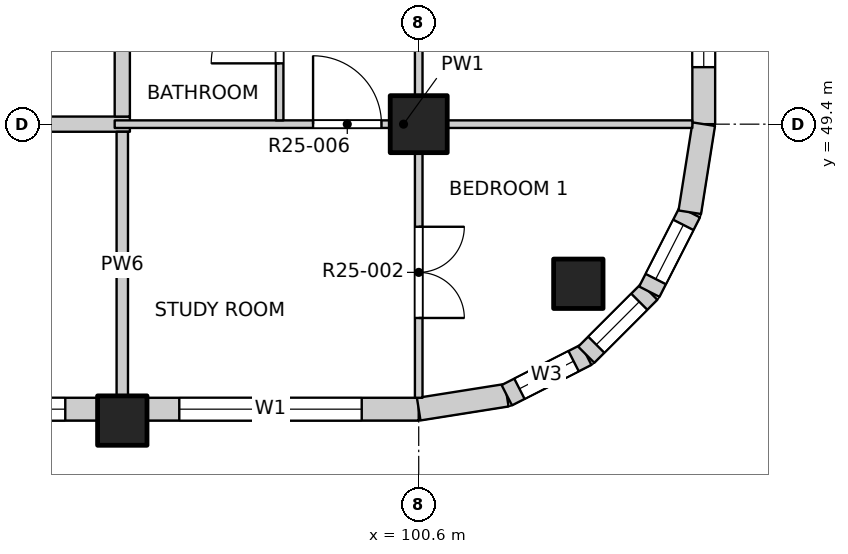
"""IFC4 building model, lengths in metres.
Left out: names, types, materials, properties, quantities, classifications, styles, units other than length and angle.
Written with IfcOpenShell. Run it as: python <this file> out.ifc"""

import sys

from ifc_helpers import new_model, si_unit, direction, frame, frame_2d, origin, origin_2d, place, context, subcontext, project, spatial, rectangle, extrude, element, fill, save


model = new_model("IFC4")
c1 = context("Model", 3, precision=1e-05, world=origin(), true_north=direction((0.0, 1.0)))
c2 = subcontext(c1, "Body", "Model", "MODEL_VIEW")
j1 = project(units=[si_unit("LENGTHUNIT", "METRE"), si_unit("PLANEANGLEUNIT", "RADIAN")], contexts=[c1])
p1 = place(None, origin())
s1 = spatial("IfcSite", under=j1, at=p1, CompositionType="ELEMENT")
p2 = place(p1, origin())
s2 = spatial("IfcBuilding", under=s1, at=p2, CompositionType="ELEMENT")
p3 = place(p2, frame((0.0, 0.0, 252.8)))
s3 = spatial("IfcBuildingStorey", under=s2, at=p3, CompositionType="ELEMENT", Elevation=252.8)
for number, where, z_axis, x_axis in (
    (1, (102.7, 47.3, -0.25), (0.0, 0.0, 1.0), (1.0, 0.0, 0.0)),
    (2, (96.7, 45.5, -0.25), (0.0, 0.0, 1.0), (1.0, 0.0, 0.0)),
):
    element("IfcColumn", number, at=place(p3, frame(where, z_axis=z_axis, x_axis=x_axis)), inside=s3, PredefinedType="COLUMN", context=c2, shape_type="SweptSolid", body=[
        extrude(rectangle(XDim=0.65, YDim=0.65, at=origin_2d()), origin(), (0.0, 0.0, 1.0), 3.4),
    ])
p4 = place(p3, frame((100.6, 49.4, -0.25), z_axis=(0.0, 0.0, 1.0), x_axis=(1.0, 0.0, 0.0)))
e3 = element("IfcColumn", 3, at=p4, inside=s3, PredefinedType="COLUMN", context=c2, shape_type="SweptSolid", body=[
    extrude(rectangle(XDim=0.75, YDim=0.75, at=origin_2d()), origin(), (0.0, 0.0, 1.0), 3.4),
])
p5 = place(p3, frame((89.225, 45.65, 0.0), z_axis=(0.0, 0.0, 1.0), x_axis=(1.0, 0.0, 0.0)))
e4 = element("IfcWall", 4, at=p5, inside=s3, PredefinedType="SOLIDWALL", context=c2, shape_type="SweptSolid", body=[
    extrude(rectangle(XDim=7.15, YDim=0.3, at=frame_2d((3.575, 0.0))), origin(), (0.0, 0.0, 1.0), 2.7),
])
p6 = place(p5, frame((0.425, 0.0, 0.9)))
e5 = element("IfcOpeningElement", 5, at=p6, cuts=e4, PredefinedType="OPENING", context=c2, shape_type="SweptSolid", body=[
    extrude(rectangle(XDim=2.4, YDim=1.8, at=frame_2d((1.2, 0.9))), frame((0.0, 0.16, 0.0), z_axis=(0.0, -1.0, 0.0), x_axis=(1.0, 0.0, 0.0)), (0.0, 0.0, 1.0), 0.32),
])
p7 = place(p5, frame((4.325, 0.0, 0.9)))
e6 = element("IfcOpeningElement", 6, at=p7, cuts=e4, PredefinedType="OPENING", context=c2, shape_type="SweptSolid", body=[
    extrude(rectangle(XDim=2.4, YDim=1.8, at=frame_2d((1.2, 0.9))), frame((0.0, 0.16, 0.0), z_axis=(0.0, -1.0, 0.0), x_axis=(1.0, 0.0, 0.0)), (0.0, 0.0, 1.0), 0.32),
])
p8 = place(p3, frame((97.025, 45.65, 0.0), z_axis=(0.0, 0.0, 1.0), x_axis=(1.0, 0.0, 0.0)))
e7 = element("IfcWall", 7, at=p8, inside=s3, PredefinedType="SOLIDWALL", context=c2, shape_type="SweptSolid", body=[
    extrude(rectangle(XDim=3.575, YDim=0.3, at=frame_2d((1.788, 0.0))), origin(), (0.0, 0.0, 1.0), 2.7),
])
p9 = place(p8, frame((0.425, 0.0, 0.9)))
e8 = element("IfcOpeningElement", 8, at=p9, cuts=e7, PredefinedType="OPENING", context=c2, shape_type="SweptSolid", body=[
    extrude(rectangle(XDim=2.4, YDim=1.8, at=frame_2d((1.2, 0.9))), frame((0.0, 0.16, 0.0), z_axis=(0.0, -1.0, 0.0), x_axis=(1.0, 0.0, 0.0)), (0.0, 0.0, 1.0), 0.32),
])
p10 = place(p3, frame((104.35, 49.4, 0.0), z_axis=(0.0, 0.0, 1.0), x_axis=(0.0, 1.0, 0.0)))
e9 = element("IfcWall", 9, at=p10, inside=s3, PredefinedType="SOLIDWALL", context=c2, shape_type="SweptSolid", body=[
    extrude(rectangle(XDim=3.575, YDim=0.3, at=frame_2d((1.788, 0.0))), origin(), (0.0, 0.0, 1.0), 2.7),
])
p11 = place(p10, frame((0.75, 0.0, 0.9)))
e10 = element("IfcOpeningElement", 10, at=p11, cuts=e9, PredefinedType="OPENING", context=c2, shape_type="SweptSolid", body=[
    extrude(rectangle(XDim=2.4, YDim=1.8, at=frame_2d((1.2, 0.9))), frame((0.0, 0.16, 0.0), z_axis=(0.0, -1.0, 0.0), x_axis=(1.0, 0.0, 0.0)), (0.0, 0.0, 1.0), 0.32),
])
p12 = place(p3, frame((100.6, 45.65, 0.0), z_axis=(0.0, 0.0, 1.0), x_axis=(0.987678452879, 0.156496880861, 0.0)))
e11 = element("IfcWall", 11, at=p12, inside=s3, PredefinedType="SOLIDWALL", context=c2, shape_type="SweptSolid", body=[
    extrude(rectangle(XDim=1.173, YDim=0.3, at=frame_2d((0.586, 0.0))), origin(), (0.0, 0.0, 1.0), 2.7),
])
p13 = place(p3, frame((101.759, 45.833, 0.0), z_axis=(0.0, 0.0, 1.0), x_axis=(0.890988677504, 0.454025524128, 0.0)))
e12 = element("IfcWall", 12, at=p13, inside=s3, PredefinedType="SOLIDWALL", context=c2, shape_type="SweptSolid", body=[
    extrude(rectangle(XDim=1.173, YDim=0.3, at=frame_2d((0.587, 0.0))), origin(), (0.0, 0.0, 1.0), 2.7),
])
p14 = place(p13, frame((0.187, 0.0, 0.9)))
e13 = element("IfcOpeningElement", 13, at=p14, cuts=e12, PredefinedType="OPENING", context=c2, shape_type="SweptSolid", body=[
    extrude(rectangle(XDim=0.8, YDim=1.2, at=frame_2d((0.4, 0.6))), frame((0.0, 0.16, 0.0), z_axis=(0.0, -1.0, 0.0), x_axis=(1.0, 0.0, 0.0)), (0.0, 0.0, 1.0), 0.32),
])
p15 = place(p3, frame((102.804, 46.366, 0.0), z_axis=(0.0, 0.0, 1.0), x_axis=(0.707106781187, 0.707106781187, 0.0)))
e14 = element("IfcWall", 14, at=p15, inside=s3, PredefinedType="SOLIDWALL", context=c2, shape_type="SweptSolid", body=[
    extrude(rectangle(XDim=1.173, YDim=0.3, at=frame_2d((0.586, 0.0))), origin(), (0.0, 0.0, 1.0), 2.7),
])
p16 = place(p15, frame((0.187, 0.0, 0.9)))
e15 = element("IfcOpeningElement", 15, at=p16, cuts=e14, PredefinedType="OPENING", context=c2, shape_type="SweptSolid", body=[
    extrude(rectangle(XDim=0.8, YDim=1.2, at=frame_2d((0.4, 0.6))), frame((0.0, 0.16, 0.0), z_axis=(0.0, -1.0, 0.0), x_axis=(1.0, 0.0, 0.0)), (0.0, 0.0, 1.0), 0.32),
])
p17 = place(p3, frame((103.634, 47.196, 0.0), z_axis=(0.0, 0.0, 1.0), x_axis=(0.454025524128, 0.890988677504, 0.0)))
e16 = element("IfcWall", 16, at=p17, inside=s3, PredefinedType="SOLIDWALL", context=c2, shape_type="SweptSolid", body=[
    extrude(rectangle(XDim=1.173, YDim=0.3, at=frame_2d((0.587, 0.0))), origin(), (0.0, 0.0, 1.0), 2.7),
])
p18 = place(p17, frame((0.187, 0.0, 0.9)))
e17 = element("IfcOpeningElement", 17, at=p18, cuts=e16, PredefinedType="OPENING", context=c2, shape_type="SweptSolid", body=[
    extrude(rectangle(XDim=0.8, YDim=1.2, at=frame_2d((0.4, 0.6))), frame((0.0, 0.16, 0.0), z_axis=(0.0, -1.0, 0.0), x_axis=(1.0, 0.0, 0.0)), (0.0, 0.0, 1.0), 0.32),
])
p19 = place(p3, frame((104.167, 48.241, 0.0), z_axis=(0.0, 0.0, 1.0), x_axis=(0.156496880861, 0.987678452879, 0.0)))
e18 = element("IfcWall", 18, at=p19, inside=s3, PredefinedType="SOLIDWALL", context=c2, shape_type="SweptSolid", body=[
    extrude(rectangle(XDim=1.173, YDim=0.3, at=frame_2d((0.586, 0.0))), origin(), (0.0, 0.0, 1.0), 2.7),
])
p20 = place(p3, frame((73.2, 49.4, 0.0), z_axis=(0.0, 0.0, 1.0), x_axis=(1.0, 0.0, 0.0)))
e19 = element("IfcWall", 19, at=p20, inside=s3, PredefinedType="PARTITIONING", context=c2, shape_type="SweptSolid", body=[
    extrude(rectangle(XDim=23.6, YDim=0.2, at=frame_2d((11.8, 0.0))), origin(), (0.0, 0.0, 1.0), 3.15),
])
p21 = place(p20, frame((2.325, 0.0, 0.0)))
e20 = element("IfcOpeningElement", 20, at=p21, cuts=e19, PredefinedType="OPENING", context=c2, shape_type="SweptSolid", body=[
    extrude(rectangle(XDim=1.2, YDim=2.1, at=frame_2d((0.6, 1.05))), frame((0.0, 0.11, 0.0), z_axis=(0.0, -1.0, 0.0), x_axis=(1.0, 0.0, 0.0)), (0.0, 0.0, 1.0), 0.22),
])
p22 = place(p20, frame((15.1, 0.0, 0.0)))
e21 = element("IfcOpeningElement", 21, at=p22, cuts=e19, PredefinedType="OPENING", context=c2, shape_type="SweptSolid", body=[
    extrude(rectangle(XDim=1.2, YDim=2.1, at=frame_2d((0.6, 1.05))), frame((0.0, 0.11, 0.0), z_axis=(0.0, -1.0, 0.0), x_axis=(1.0, 0.0, 0.0)), (0.0, 0.0, 1.0), 0.22),
])
p23 = place(p3, frame((96.6, 49.4, 0.0), z_axis=(0.0, 0.0, 1.0), x_axis=(1.0, 0.0, 0.0)))
e22 = element("IfcWall", 22, at=p23, inside=s3, PredefinedType="PARTITIONING", context=c2, shape_type="SweptSolid", body=[
    extrude(rectangle(XDim=7.6, YDim=0.1, at=frame_2d((3.8, 0.0))), origin(), (0.0, 0.0, 1.0), 3.15),
])
p24 = place(p23, frame((2.61, 0.0, 0.0)))
e23 = element("IfcOpeningElement", 23, at=p24, cuts=e22, PredefinedType="OPENING", context=c2, shape_type="SweptSolid", body=[
    extrude(rectangle(XDim=0.9, YDim=2.1, at=frame_2d((0.45, 1.05))), frame((0.0, 0.06, 0.0), z_axis=(0.0, -1.0, 0.0), x_axis=(1.0, 0.0, 0.0)), (0.0, 0.0, 1.0), 0.12),
])
p25 = place(p3, frame((96.7, 45.8, 0.0), z_axis=(0.0, 0.0, 1.0), x_axis=(0.0, 1.0, 0.0)))
e24 = element("IfcWall", 24, at=p25, inside=s3, PredefinedType="PARTITIONING", context=c2, shape_type="SweptSolid", body=[
    extrude(rectangle(XDim=3.5, YDim=0.15, at=frame_2d((1.75, 0.0))), origin(), (0.0, 0.0, 1.0), 3.15),
])
p26 = place(p3, frame((96.7, 49.5, 0.0), z_axis=(0.0, 0.0, 1.0), x_axis=(0.0, 1.0, 0.0)))
e25 = element("IfcWall", 25, at=p26, inside=s3, PredefinedType="PARTITIONING", context=c2, shape_type="SweptSolid", body=[
    extrude(rectangle(XDim=34.7, YDim=0.2, at=frame_2d((17.35, 0.0))), origin(), (0.0, 0.0, 1.0), 3.15),
])
p27 = place(p26, frame((6.575, 0.0, 0.0)))
e26 = element("IfcOpeningElement", 26, at=p27, cuts=e25, PredefinedType="OPENING", context=c2, shape_type="SweptSolid", body=[
    extrude(rectangle(XDim=1.0, YDim=2.1, at=frame_2d((0.5, 1.05))), frame((0.0, 0.11, 0.0), z_axis=(0.0, -1.0, 0.0), x_axis=(1.0, 0.0, 0.0)), (0.0, 0.0, 1.0), 0.22),
])
p28 = place(p26, frame((13.975, 0.0, 0.0)))
e27 = element("IfcOpeningElement", 27, at=p28, cuts=e25, PredefinedType="OPENING", context=c2, shape_type="SweptSolid", body=[
    extrude(rectangle(XDim=1.0, YDim=2.1, at=frame_2d((0.5, 1.05))), frame((0.0, 0.11, 0.0), z_axis=(0.0, -1.0, 0.0), x_axis=(1.0, 0.0, 0.0)), (0.0, 0.0, 1.0), 0.22),
])
p29 = place(p26, frame((26.525, 0.0, 0.0)))
e28 = element("IfcOpeningElement", 28, at=p29, cuts=e25, PredefinedType="OPENING", context=c2, shape_type="SweptSolid", body=[
    extrude(rectangle(XDim=1.0, YDim=2.1, at=frame_2d((0.5, 1.05))), frame((0.0, 0.11, 0.0), z_axis=(0.0, -1.0, 0.0), x_axis=(1.0, 0.0, 0.0)), (0.0, 0.0, 1.0), 0.22),
])
p30 = place(p3, frame((98.77, 49.45, 0.0), z_axis=(0.0, 0.0, 1.0), x_axis=(0.0, 1.0, 0.0)))
e29 = element("IfcWall", 29, at=p30, inside=s3, PredefinedType="PARTITIONING", context=c2, shape_type="SweptSolid", body=[
    extrude(rectangle(XDim=5.3, YDim=0.1, at=frame_2d((2.65, 0.0))), origin(), (0.0, 0.0, 1.0), 3.15),
])
p31 = place(p30, frame((0.75, 0.0, 0.0)))
e30 = element("IfcOpeningElement", 30, at=p31, cuts=e29, PredefinedType="OPENING", context=c2, shape_type="SweptSolid", body=[
    extrude(rectangle(XDim=0.9, YDim=2.1, at=frame_2d((0.45, 1.05))), frame((0.0, 0.06, 0.0), z_axis=(0.0, -1.0, 0.0), x_axis=(1.0, 0.0, 0.0)), (0.0, 0.0, 1.0), 0.12),
])
p32 = place(p30, frame((3.5, 0.0, 0.0)))
e31 = element("IfcOpeningElement", 31, at=p32, cuts=e29, PredefinedType="OPENING", context=c2, shape_type="SweptSolid", body=[
    extrude(rectangle(XDim=0.8, YDim=2.1, at=frame_2d((0.4, 1.05))), frame((0.0, 0.06, 0.0), z_axis=(0.0, -1.0, 0.0), x_axis=(1.0, 0.0, 0.0)), (0.0, 0.0, 1.0), 0.12),
])
p33 = place(p3, frame((100.6, 45.8, 0.0), z_axis=(0.0, 0.0, 1.0), x_axis=(0.0, 1.0, 0.0)))
e32 = element("IfcWall", 32, at=p33, inside=s3, PredefinedType="PARTITIONING", context=c2, shape_type="SweptSolid", body=[
    extrude(rectangle(XDim=38.4, YDim=0.1, at=frame_2d((19.2, 0.0))), origin(), (0.0, 0.0, 1.0), 3.15),
])
p34 = place(p33, frame((1.05, 0.0, 0.0)))
e33 = element("IfcOpeningElement", 33, at=p34, cuts=e32, PredefinedType="OPENING", context=c2, shape_type="SweptSolid", body=[
    extrude(rectangle(XDim=1.2, YDim=2.1, at=frame_2d((0.6, 1.05))), frame((0.0, 0.06, 0.0), z_axis=(0.0, -1.0, 0.0), x_axis=(1.0, 0.0, 0.0)), (0.0, 0.0, 1.0), 0.12),
])
p35 = place(p33, frame((5.1, 0.0, 0.0)))
e34 = element("IfcOpeningElement", 34, at=p35, cuts=e32, PredefinedType="OPENING", context=c2, shape_type="SweptSolid", body=[
    extrude(rectangle(XDim=0.9, YDim=2.1, at=frame_2d((0.45, 1.05))), frame((0.0, 0.06, 0.0), z_axis=(0.0, -1.0, 0.0), x_axis=(1.0, 0.0, 0.0)), (0.0, 0.0, 1.0), 0.12),
])
p36 = place(p33, frame((9.0, 0.0, 0.0)))
e35 = element("IfcOpeningElement", 35, at=p36, cuts=e32, PredefinedType="OPENING", context=c2, shape_type="SweptSolid", body=[
    extrude(rectangle(XDim=0.9, YDim=2.1, at=frame_2d((0.45, 1.05))), frame((0.0, 0.06, 0.0), z_axis=(0.0, -1.0, 0.0), x_axis=(1.0, 0.0, 0.0)), (0.0, 0.0, 1.0), 0.12),
])
p37 = place(p33, frame((12.9, 0.0, 0.0)))
e36 = element("IfcOpeningElement", 36, at=p37, cuts=e32, PredefinedType="OPENING", context=c2, shape_type="SweptSolid", body=[
    extrude(rectangle(XDim=0.9, YDim=2.1, at=frame_2d((0.45, 1.05))), frame((0.0, 0.06, 0.0), z_axis=(0.0, -1.0, 0.0), x_axis=(1.0, 0.0, 0.0)), (0.0, 0.0, 1.0), 0.12),
])
p38 = place(p33, frame((16.8, 0.0, 0.0)))
e37 = element("IfcOpeningElement", 37, at=p38, cuts=e32, PredefinedType="OPENING", context=c2, shape_type="SweptSolid", body=[
    extrude(rectangle(XDim=0.9, YDim=2.1, at=frame_2d((0.45, 1.05))), frame((0.0, 0.06, 0.0), z_axis=(0.0, -1.0, 0.0), x_axis=(1.0, 0.0, 0.0)), (0.0, 0.0, 1.0), 0.12),
])
p39 = place(p33, frame((20.7, 0.0, 0.0)))
e38 = element("IfcOpeningElement", 38, at=p39, cuts=e32, PredefinedType="OPENING", context=c2, shape_type="SweptSolid", body=[
    extrude(rectangle(XDim=0.9, YDim=2.1, at=frame_2d((0.45, 1.05))), frame((0.0, 0.06, 0.0), z_axis=(0.0, -1.0, 0.0), x_axis=(1.0, 0.0, 0.0)), (0.0, 0.0, 1.0), 0.12),
])
p40 = place(p33, frame((24.6, 0.0, 0.0)))
e39 = element("IfcOpeningElement", 39, at=p40, cuts=e32, PredefinedType="OPENING", context=c2, shape_type="SweptSolid", body=[
    extrude(rectangle(XDim=0.9, YDim=2.1, at=frame_2d((0.45, 1.05))), frame((0.0, 0.06, 0.0), z_axis=(0.0, -1.0, 0.0), x_axis=(1.0, 0.0, 0.0)), (0.0, 0.0, 1.0), 0.12),
])
p41 = place(p33, frame((28.5, 0.0, 0.0)))
e40 = element("IfcOpeningElement", 40, at=p41, cuts=e32, PredefinedType="OPENING", context=c2, shape_type="SweptSolid", body=[
    extrude(rectangle(XDim=0.9, YDim=2.1, at=frame_2d((0.45, 1.05))), frame((0.0, 0.06, 0.0), z_axis=(0.0, -1.0, 0.0), x_axis=(1.0, 0.0, 0.0)), (0.0, 0.0, 1.0), 0.12),
])
p42 = place(p33, frame((32.4, 0.0, 0.0)))
e41 = element("IfcOpeningElement", 41, at=p42, cuts=e32, PredefinedType="OPENING", context=c2, shape_type="SweptSolid", body=[
    extrude(rectangle(XDim=0.9, YDim=2.1, at=frame_2d((0.45, 1.05))), frame((0.0, 0.06, 0.0), z_axis=(0.0, -1.0, 0.0), x_axis=(1.0, 0.0, 0.0)), (0.0, 0.0, 1.0), 0.12),
])
p43 = place(p33, frame((36.15, 0.0, 0.0)))
e42 = element("IfcOpeningElement", 42, at=p43, cuts=e32, PredefinedType="OPENING", context=c2, shape_type="SweptSolid", body=[
    extrude(rectangle(XDim=1.2, YDim=2.1, at=frame_2d((0.6, 1.05))), frame((0.0, 0.06, 0.0), z_axis=(0.0, -1.0, 0.0), x_axis=(1.0, 0.0, 0.0)), (0.0, 0.0, 1.0), 0.12),
])
p44 = place(p7, origin())
e43 = element("IfcWindow", 43, at=p44, inside=s3, PartitioningType="DOUBLE_PANEL_VERTICAL", PredefinedType="WINDOW", context=c2, shape_type="SweptSolid", body=[
    extrude(rectangle(XDim=2.4, YDim=1.8, at=frame_2d((1.2, 0.9))), frame((0.0, 0.03, 0.0), z_axis=(0.0, -1.0, 0.0), x_axis=(1.0, 0.0, 0.0)), (0.0, 0.0, 1.0), 0.06),
])
fill(e6, e43)
p45 = place(p9, origin())
e44 = element("IfcWindow", 44, at=p45, inside=s3, PartitioningType="DOUBLE_PANEL_VERTICAL", PredefinedType="WINDOW", context=c2, shape_type="SweptSolid", body=[
    extrude(rectangle(XDim=2.4, YDim=1.8, at=frame_2d((1.2, 0.9))), frame((0.0, 0.03, 0.0), z_axis=(0.0, -1.0, 0.0), x_axis=(1.0, 0.0, 0.0)), (0.0, 0.0, 1.0), 0.06),
])
fill(e8, e44)
p46 = place(p11, origin())
e45 = element("IfcWindow", 45, at=p46, inside=s3, PartitioningType="DOUBLE_PANEL_VERTICAL", PredefinedType="WINDOW", context=c2, shape_type="SweptSolid", body=[
    extrude(rectangle(XDim=2.4, YDim=1.8, at=frame_2d((1.2, 0.9))), frame((0.0, 0.03, 0.0), z_axis=(0.0, -1.0, 0.0), x_axis=(1.0, 0.0, 0.0)), (0.0, 0.0, 1.0), 0.06),
])
fill(e10, e45)
p47 = place(p14, origin())
e46 = element("IfcWindow", 46, at=p47, inside=s3, PartitioningType="SINGLE_PANEL", PredefinedType="WINDOW", context=c2, shape_type="SweptSolid", body=[
    extrude(rectangle(XDim=0.8, YDim=1.2, at=frame_2d((0.4, 0.6))), frame((0.0, 0.03, 0.0), z_axis=(0.0, -1.0, 0.0), x_axis=(1.0, 0.0, 0.0)), (0.0, 0.0, 1.0), 0.06),
])
fill(e13, e46)
p48 = place(p16, origin())
e47 = element("IfcWindow", 47, at=p48, inside=s3, PartitioningType="SINGLE_PANEL", PredefinedType="WINDOW", context=c2, shape_type="SweptSolid", body=[
    extrude(rectangle(XDim=0.8, YDim=1.2, at=frame_2d((0.4, 0.6))), frame((0.0, 0.03, 0.0), z_axis=(0.0, -1.0, 0.0), x_axis=(1.0, 0.0, 0.0)), (0.0, 0.0, 1.0), 0.06),
])
fill(e15, e47)
p49 = place(p18, origin())
e48 = element("IfcWindow", 48, at=p49, inside=s3, PartitioningType="SINGLE_PANEL", PredefinedType="WINDOW", context=c2, shape_type="SweptSolid", body=[
    extrude(rectangle(XDim=0.8, YDim=1.2, at=frame_2d((0.4, 0.6))), frame((0.0, 0.03, 0.0), z_axis=(0.0, -1.0, 0.0), x_axis=(1.0, 0.0, 0.0)), (0.0, 0.0, 1.0), 0.06),
])
fill(e17, e48)
p50 = place(p34, origin())
e49 = element("IfcDoor", 49, at=p50, inside=s3, OperationType="DOUBLE_DOOR_SINGLE_SWING", PredefinedType="DOOR", context=c2, shape_type="SweptSolid", body=[
    extrude(rectangle(XDim=1.2, YDim=2.1, at=frame_2d((0.6, 1.05))), frame((0.0, 0.025, 0.0), z_axis=(0.0, -1.0, 0.0), x_axis=(1.0, 0.0, 0.0)), (0.0, 0.0, 1.0), 0.05),
])
fill(e33, e49)
p51 = place(p24, origin())
e50 = element("IfcDoor", 50, at=p51, inside=s3, OperationType="SINGLE_SWING_LEFT", PredefinedType="DOOR", context=c2, shape_type="SweptSolid", body=[
    extrude(rectangle(XDim=0.9, YDim=2.1, at=frame_2d((0.45, 1.05))), frame((0.0, 0.025, 0.0), z_axis=(0.0, -1.0, 0.0), x_axis=(1.0, 0.0, 0.0)), (0.0, 0.0, 1.0), 0.05),
])
fill(e23, e50)
p52 = place(p31, origin())
e51 = element("IfcDoor", 51, at=p52, inside=s3, OperationType="SINGLE_SWING_LEFT", PredefinedType="DOOR", context=c2, shape_type="SweptSolid", body=[
    extrude(rectangle(XDim=0.9, YDim=2.1, at=frame_2d((0.45, 1.05))), frame((0.0, 0.025, 0.0), z_axis=(0.0, -1.0, 0.0), x_axis=(1.0, 0.0, 0.0)), (0.0, 0.0, 1.0), 0.05),
])
fill(e30, e51)
save(model, sys.argv[1])
